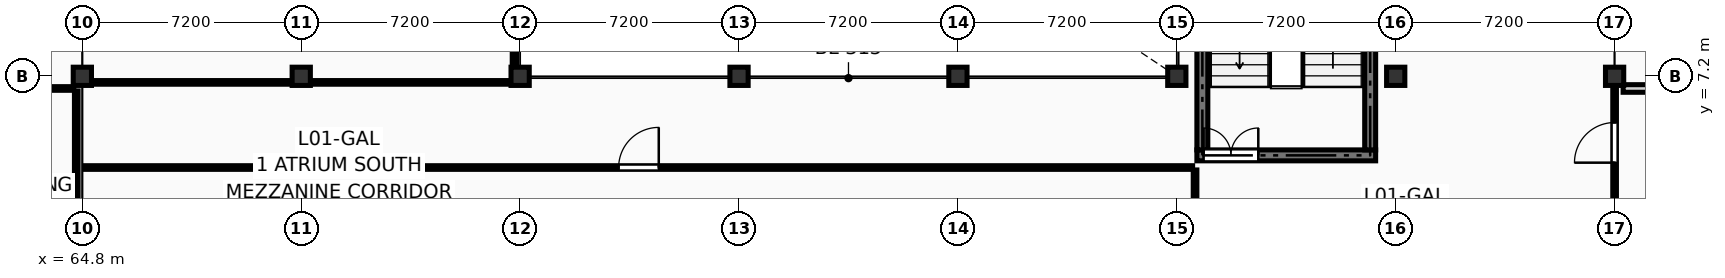
"""IFC4 building model, lengths in metres.
Left out: names, types, materials, properties, quantities, classifications, styles, units other than length and angle.
Written with IfcOpenShell. Run it as: python <this file> out.ifc"""

import sys

from ifc_helpers import new_model, si_unit, direction, frame, frame_2d, origin, origin_2d, place, context, subcontext, project, spatial, rectangle, extrude, element, fill, save


model = new_model("IFC4")
c1 = context("Model", 3, precision=1e-05, world=origin(), true_north=direction((0.0, 1.0)))
c2 = subcontext(c1, "Body", "Model", "MODEL_VIEW")
j1 = project(units=[si_unit("LENGTHUNIT", "METRE"), si_unit("PLANEANGLEUNIT", "RADIAN")], contexts=[c1])
p1 = place(None, origin())
s1 = spatial("IfcSite", under=j1, at=p1, CompositionType="ELEMENT")
p2 = place(p1, origin())
s2 = spatial("IfcBuilding", under=s1, at=p2, CompositionType="ELEMENT")
p3 = place(p2, frame((0.0, 0.0, 4.5)))
s3 = spatial("IfcBuildingStorey", under=s2, at=p3, CompositionType="ELEMENT", Elevation=4.5)
for number, where, z_axis, x_axis in (
    (1, (64.8, 7.2, 0.0), (0.0, 0.0, 1.0), (1.0, 0.0, 0.0)),
    (2, (72.0, 7.2, 0.0), (0.0, 0.0, 1.0), (1.0, 0.0, 0.0)),
    (3, (79.2, 7.2, 0.0), (0.0, 0.0, 1.0), (1.0, 0.0, 0.0)),
    (4, (86.4, 7.2, 0.0), (0.0, 0.0, 1.0), (1.0, 0.0, 0.0)),
    (5, (93.6, 7.2, 0.0), (0.0, 0.0, 1.0), (1.0, 0.0, 0.0)),
    (6, (100.8, 7.2, 0.0), (0.0, 0.0, 1.0), (1.0, 0.0, 0.0)),
    (7, (108.0, 7.2, 0.0), (0.0, 0.0, 1.0), (1.0, 0.0, 0.0)),
    (8, (115.2, 7.2, 0.0), (0.0, 0.0, 1.0), (1.0, 0.0, 0.0)),
):
    element("IfcColumn", number, at=place(p3, frame(where, z_axis=z_axis, x_axis=x_axis)), inside=s3, PredefinedType="COLUMN", context=c2, shape_type="SweptSolid", body=[
        extrude(rectangle(XDim=0.6, YDim=0.6, at=origin_2d()), origin(), (0.0, 0.0, 1.0), 4.05),
    ])
p4 = place(p3, frame((101.46, 4.6, 0.0), z_axis=(0.0, 0.0, 1.0), x_axis=(1.0, 0.0, 0.0)))
e9 = element("IfcWall", 9, at=p4, inside=s3, PredefinedType="SHEAR", context=c2, shape_type="SweptSolid", body=[
    extrude(rectangle(XDim=5.88, YDim=0.36, at=frame_2d((2.94, 0.0))), origin(), (0.0, 0.0, 1.0), 3.79),
])
p5 = place(p4, frame((0.22, 0.0, 0.0)))
e10 = element("IfcOpeningElement", 10, at=p5, cuts=e9, PredefinedType="OPENING", context=c2, shape_type="SweptSolid", body=[
    extrude(rectangle(XDim=1.8, YDim=2.2, at=frame_2d((0.9, 1.1))), frame((0.0, 0.192, 0.0), z_axis=(0.0, -1.0, 0.0), x_axis=(1.0, 0.0, 0.0)), (0.0, 0.0, 1.0), 0.384),
])
for number, where, z_axis, x_axis in (
    (11, (101.64, 4.78, 0.0), (0.0, 0.0, 1.0), (0.0, 1.0, 0.0)),
    (12, (107.16, 4.78, 0.0), (0.0, 0.0, 1.0), (0.0, 1.0, 0.0)),
):
    element("IfcWall", number, at=place(p3, frame(where, z_axis=z_axis, x_axis=x_axis)), inside=s3, PredefinedType="SHEAR", context=c2, shape_type="SweptSolid", body=[
        extrude(rectangle(XDim=8.59, YDim=0.36, at=frame_2d((4.295, 0.0))), origin(), (0.0, 0.0, 1.0), 3.79),
    ])
p6 = place(p2, origin())
s4 = spatial("IfcBuildingStorey", under=s2, at=p6, CompositionType="ELEMENT", Elevation=0.0)
p7 = place(p6, frame((115.48, 6.8, 0.0), z_axis=(0.0, 0.0, 1.0), x_axis=(1.0, 0.0, 0.0)))
e13 = element("IfcWall", 13, at=p7, inside=s4, PredefinedType="PARTITIONING", context=c2, shape_type="SweptSolid", body=[
    extrude(rectangle(XDim=19.24, YDim=0.25, at=frame_2d((9.62, 0.0))), origin(), (0.0, 0.0, 1.0), 7.525),
])
p8 = place(p3, frame((64.6, 0.48, 0.0), z_axis=(0.0, 0.0, 1.0), x_axis=(0.0, 1.0, 0.0)))
e14 = element("IfcWall", 14, at=p8, inside=s3, PredefinedType="PARTITIONING", context=c2, shape_type="SweptSolid", body=[
    extrude(rectangle(XDim=6.24, YDim=0.12, at=frame_2d((3.12, 0.0))), origin(), (0.0, 0.0, 1.0), 2.925),
])
p9 = place(p3, frame((48.08, 6.8, 0.0), z_axis=(0.0, 0.0, 1.0), x_axis=(1.0, 0.0, 0.0)))
e15 = element("IfcWall", 15, at=p9, inside=s3, PredefinedType="PARTITIONING", context=c2, shape_type="SweptSolid", body=[
    extrude(rectangle(XDim=16.44, YDim=0.12, at=frame_2d((8.22, 0.0))), origin(), (0.0, 0.0, 1.0), 3.025),
])
p10 = place(p9, frame((6.031, 0.0, 0.0)))
e16 = element("IfcOpeningElement", 16, at=p10, cuts=e15, PredefinedType="OPENING", context=c2, shape_type="SweptSolid", body=[
    extrude(rectangle(XDim=1.32, YDim=2.2, at=frame_2d((0.66, 1.1))), frame((0.0, 0.072, 0.0), z_axis=(0.0, -1.0, 0.0), x_axis=(1.0, 0.0, 0.0)), (0.0, 0.0, 1.0), 0.144),
])
p11 = place(p3, frame((101.4, 0.48, 0.0), z_axis=(0.0, 0.0, 1.0), x_axis=(0.0, 1.0, 0.0)))
e17 = element("IfcWall", 17, at=p11, inside=s3, PredefinedType="PARTITIONING", context=c2, shape_type="SweptSolid", body=[
    extrude(rectangle(XDim=3.64, YDim=0.12, at=frame_2d((1.82, 0.0))), origin(), (0.0, 0.0, 1.0), 3.775),
])
p12 = place(p3, frame((64.88, 4.2, 0.0), z_axis=(0.0, 0.0, 1.0), x_axis=(1.0, 0.0, 0.0)))
e18 = element("IfcWall", 18, at=p12, inside=s3, PredefinedType="PARTITIONING", context=c2, shape_type="SweptSolid", body=[
    extrude(rectangle(XDim=36.44, YDim=0.12, at=frame_2d((18.22, 0.0))), origin(), (0.0, 0.0, 1.0), 3.775),
])
p13 = place(p12, frame((17.56, 0.0, 0.0)))
e19 = element("IfcOpeningElement", 19, at=p13, cuts=e18, PredefinedType="OPENING", context=c2, shape_type="SweptSolid", body=[
    extrude(rectangle(XDim=1.32, YDim=2.2, at=frame_2d((0.66, 1.1))), frame((0.0, 0.072, 0.0), z_axis=(0.0, -1.0, 0.0), x_axis=(1.0, 0.0, 0.0)), (0.0, 0.0, 1.0), 0.144),
])
p14 = place(p3, frame((64.88, 7.0, 0.0), z_axis=(0.0, 0.0, 1.0), x_axis=(1.0, 0.0, 0.0)))
e20 = element("IfcWall", 20, at=p14, inside=s3, PredefinedType="PARTITIONING", context=c2, shape_type="SweptSolid", body=[
    extrude(rectangle(XDim=14.04, YDim=0.12, at=frame_2d((7.02, 0.0))), origin(), (0.0, 0.0, 1.0), 3.025),
])
p15 = place(p3, frame((79.0, 7.08, 0.0), z_axis=(0.0, 0.0, 1.0), x_axis=(0.0, 1.0, 0.0)))
e21 = element("IfcWall", 21, at=p15, inside=s3, PredefinedType="PARTITIONING", context=c2, shape_type="SweptSolid", body=[
    extrude(rectangle(XDim=21.24, YDim=0.12, at=frame_2d((10.62, 0.0))), origin(), (0.0, 0.0, 1.0), 3.775),
])
p16 = place(p3, frame((115.2, 0.48, 0.0), z_axis=(0.0, 0.0, 1.0), x_axis=(0.0, 1.0, 0.0)))
e22 = element("IfcWall", 22, at=p16, inside=s3, PredefinedType="PARTITIONING", context=c2, shape_type="SweptSolid", body=[
    extrude(rectangle(XDim=6.44, YDim=0.12, at=frame_2d((3.22, 0.0))), origin(), (0.0, 0.0, 1.0), 2.925),
])
p17 = place(p16, frame((3.88, 0.0, 0.0)))
e23 = element("IfcOpeningElement", 23, at=p17, cuts=e22, PredefinedType="OPENING", context=c2, shape_type="SweptSolid", body=[
    extrude(rectangle(XDim=1.32, YDim=2.2, at=frame_2d((0.66, 1.1))), frame((0.0, 0.072, 0.0), z_axis=(0.0, -1.0, 0.0), x_axis=(1.0, 0.0, 0.0)), (0.0, 0.0, 1.0), 0.144),
])
p18 = place(p5, origin())
e24 = element("IfcDoor", 24, at=p18, inside=s3, OperationType="DOUBLE_DOOR_SINGLE_SWING", PredefinedType="DOOR", context=c2, shape_type="SweptSolid", body=[
    extrude(rectangle(XDim=1.8, YDim=2.2, at=frame_2d((0.9, 1.1))), frame((0.0, 0.025, 0.0), z_axis=(0.0, -1.0, 0.0), x_axis=(1.0, 0.0, 0.0)), (0.0, 0.0, 1.0), 0.05),
])
fill(e10, e24)
p19 = place(p13, origin())
e25 = element("IfcDoor", 25, at=p19, inside=s3, OperationType="SINGLE_SWING_RIGHT", PredefinedType="DOOR", context=c2, shape_type="SweptSolid", body=[
    extrude(rectangle(XDim=1.32, YDim=2.2, at=frame_2d((0.66, 1.1))), frame((0.0, 0.025, 0.0), z_axis=(0.0, -1.0, 0.0), x_axis=(1.0, 0.0, 0.0)), (0.0, 0.0, 1.0), 0.05),
])
fill(e19, e25)
p20 = place(p17, origin())
e26 = element("IfcDoor", 26, at=p20, inside=s3, OperationType="SINGLE_SWING_LEFT", PredefinedType="DOOR", context=c2, shape_type="SweptSolid", body=[
    extrude(rectangle(XDim=1.32, YDim=2.2, at=frame_2d((0.66, 1.1))), frame((0.0, 0.025, 0.0), z_axis=(0.0, -1.0, 0.0), x_axis=(1.0, 0.0, 0.0)), (0.0, 0.0, 1.0), 0.05),
])
fill(e23, e26)
save(model, sys.argv[1])
